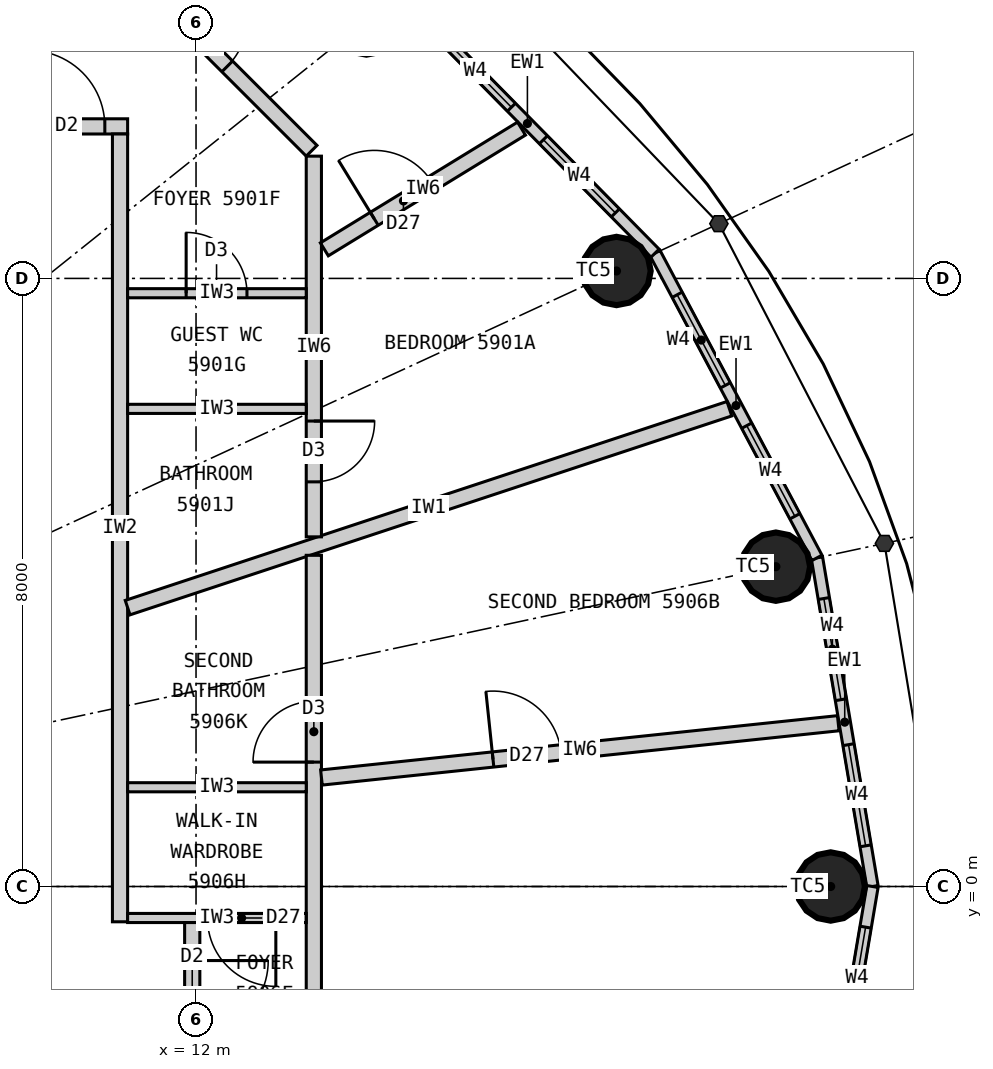
"""IFC4 building model, lengths in metres.
Left out: names, types, materials, properties, quantities, classifications, styles, units other than length and angle.
Written with IfcOpenShell. Run it as: python <this file> out.ifc"""

import sys

from ifc_helpers import new_model, si_unit, direction, frame, frame_2d, origin, origin_2d, place, context, subcontext, project, spatial, rectangle, circle, extrude, element, fill, save


model = new_model("IFC4")
c1 = context("Model", 3, precision=1e-05, world=origin(), true_north=direction((0.0, 1.0)))
c2 = subcontext(c1, "Body", "Model", "MODEL_VIEW")
j1 = project(units=[si_unit("LENGTHUNIT", "METRE"), si_unit("PLANEANGLEUNIT", "RADIAN")], contexts=[c1])
p1 = place(None, origin())
s1 = spatial("IfcSite", under=j1, at=p1, CompositionType="ELEMENT")
p2 = place(p1, origin())
s2 = spatial("IfcBuilding", under=s1, at=p2, CompositionType="ELEMENT")
p3 = place(p2, frame((0.0, 0.0, 219.3)))
s3 = spatial("IfcBuildingStorey", under=s2, at=p3, CompositionType="ELEMENT", Elevation=219.3)
for number, where, z_axis, x_axis in (
    (1, (20.35, 0.0, 0.0), (0.0, 0.0, 1.0), (1.0, 0.0, 0.0)),
    (2, (19.629, 4.208, 0.0), (0.0, 0.0, 1.0), (1.0, 0.0, 0.0)),
    (3, (17.532, 8.098, 0.0), (0.0, 0.0, 1.0), (1.0, 0.0, 0.0)),
    (4, (14.241, 11.393, 0.0), (0.0, 0.0, 1.0), (1.0, 0.0, 0.0)),
):
    element("IfcColumn", number, at=place(p3, frame(where, z_axis=z_axis, x_axis=x_axis)), inside=s3, PredefinedType="COLUMN", context=c2, shape_type="SweptSolid", body=[
        extrude(circle(Radius=0.45, at=origin_2d()), origin(), (0.0, 0.0, 1.0), 3.3),
    ])
p4 = place(p3, frame((20.9, 0.0, 0.0), z_axis=(0.0, 0.0, 1.0), x_axis=(-0.166538513568, 0.986034950445, 0.0)))
e5 = element("IfcWall", 5, at=p4, inside=s3, PredefinedType="ELEMENTEDWALL", context=c2, shape_type="SweptSolid", body=[
    extrude(rectangle(XDim=4.385, YDim=0.15, at=frame_2d((2.192, 0.0))), origin(), (0.0, 0.0, 1.0), 3.12),
])
p5 = place(p4, frame((0.542, 0.0, 0.9)))
e6 = element("IfcOpeningElement", 6, at=p5, cuts=e5, PredefinedType="OPENING", context=c2, shape_type="SweptSolid", body=[
    extrude(rectangle(XDim=1.35, YDim=1.9, at=frame_2d((0.675, 0.95))), frame((0.0, 0.085, 0.0), z_axis=(0.0, -1.0, 0.0), x_axis=(1.0, 0.0, 0.0)), (0.0, 0.0, 1.0), 0.17),
])
p6 = place(p4, frame((2.492, 0.0, 0.9)))
e7 = element("IfcOpeningElement", 7, at=p6, cuts=e5, PredefinedType="OPENING", context=c2, shape_type="SweptSolid", body=[
    extrude(rectangle(XDim=1.35, YDim=1.9, at=frame_2d((0.675, 0.95))), frame((0.0, 0.085, 0.0), z_axis=(0.0, -1.0, 0.0), x_axis=(1.0, 0.0, 0.0)), (0.0, 0.0, 1.0), 0.17),
])
p7 = place(p3, frame((20.17, 4.323, 0.0), z_axis=(0.0, 0.0, 1.0), x_axis=(-0.469256152955, 0.883062094597, 0.0)))
e8 = element("IfcWall", 8, at=p7, inside=s3, PredefinedType="ELEMENTEDWALL", context=c2, shape_type="SweptSolid", body=[
    extrude(rectangle(XDim=4.539, YDim=0.15, at=frame_2d((2.27, 0.0))), origin(), (0.0, 0.0, 1.0), 3.12),
])
p8 = place(p7, frame((0.62, 0.0, 0.9)))
e9 = element("IfcOpeningElement", 9, at=p8, cuts=e8, PredefinedType="OPENING", context=c2, shape_type="SweptSolid", body=[
    extrude(rectangle(XDim=1.35, YDim=1.9, at=frame_2d((0.675, 0.95))), frame((0.0, 0.085, 0.0), z_axis=(0.0, -1.0, 0.0), x_axis=(1.0, 0.0, 0.0)), (0.0, 0.0, 1.0), 0.17),
])
p9 = place(p7, frame((2.57, 0.0, 0.9)))
e10 = element("IfcOpeningElement", 10, at=p9, cuts=e8, PredefinedType="OPENING", context=c2, shape_type="SweptSolid", body=[
    extrude(rectangle(XDim=1.35, YDim=1.9, at=frame_2d((0.675, 0.95))), frame((0.0, 0.085, 0.0), z_axis=(0.0, -1.0, 0.0), x_axis=(1.0, 0.0, 0.0)), (0.0, 0.0, 1.0), 0.17),
])
p10 = place(p3, frame((18.04, 8.332, 0.0), z_axis=(0.0, 0.0, 1.0), x_axis=(-0.701527379618, 0.712642501993, 0.0)))
e11 = element("IfcWall", 11, at=p10, inside=s3, PredefinedType="ELEMENTEDWALL", context=c2, shape_type="SweptSolid", body=[
    extrude(rectangle(XDim=4.788, YDim=0.15, at=frame_2d((2.394, 0.0))), origin(), (0.0, 0.0, 1.0), 3.12),
])
p11 = place(p10, frame((0.744, 0.0, 0.9)))
e12 = element("IfcOpeningElement", 12, at=p11, cuts=e11, PredefinedType="OPENING", context=c2, shape_type="SweptSolid", body=[
    extrude(rectangle(XDim=1.35, YDim=1.9, at=frame_2d((0.675, 0.95))), frame((0.0, 0.085, 0.0), z_axis=(0.0, -1.0, 0.0), x_axis=(1.0, 0.0, 0.0)), (0.0, 0.0, 1.0), 0.17),
])
p12 = place(p10, frame((2.694, 0.0, 0.9)))
e13 = element("IfcOpeningElement", 13, at=p12, cuts=e11, PredefinedType="OPENING", context=c2, shape_type="SweptSolid", body=[
    extrude(rectangle(XDim=1.35, YDim=1.9, at=frame_2d((0.675, 0.95))), frame((0.0, 0.085, 0.0), z_axis=(0.0, -1.0, 0.0), x_axis=(1.0, 0.0, 0.0)), (0.0, 0.0, 1.0), 0.17),
])
p13 = place(p3, frame((20.17, -4.323, 0.0), z_axis=(0.0, 0.0, 1.0), x_axis=(0.166538513568, 0.986034950445, 0.0)))
e14 = element("IfcWall", 14, at=p13, inside=s3, PredefinedType="ELEMENTEDWALL", context=c2, shape_type="SweptSolid", body=[
    extrude(rectangle(XDim=4.385, YDim=0.15, at=frame_2d((2.192, 0.0))), origin(), (0.0, 0.0, 1.0), 3.12),
])
p14 = place(p13, frame((0.542, 0.0, 0.9)))
e15 = element("IfcOpeningElement", 15, at=p14, cuts=e14, PredefinedType="OPENING", context=c2, shape_type="SweptSolid", body=[
    extrude(rectangle(XDim=1.35, YDim=1.9, at=frame_2d((0.675, 0.95))), frame((0.0, 0.085, 0.0), z_axis=(0.0, -1.0, 0.0), x_axis=(1.0, 0.0, 0.0)), (0.0, 0.0, 1.0), 0.17),
])
p15 = place(p13, frame((2.492, 0.0, 0.9)))
e16 = element("IfcOpeningElement", 16, at=p15, cuts=e14, PredefinedType="OPENING", context=c2, shape_type="SweptSolid", body=[
    extrude(rectangle(XDim=1.35, YDim=1.9, at=frame_2d((0.675, 0.95))), frame((0.0, 0.085, 0.0), z_axis=(0.0, -1.0, 0.0), x_axis=(1.0, 0.0, 0.0)), (0.0, 0.0, 1.0), 0.17),
])
p16 = place(p3, frame((-11.1, 10.0, 0.0), z_axis=(0.0, 0.0, 1.0), x_axis=(1.0, 0.0, 0.0)))
e17 = element("IfcWall", 17, at=p16, inside=s3, PredefinedType="PARTITIONING", context=c2, shape_type="SweptSolid", body=[
    extrude(rectangle(XDim=22.2, YDim=0.2, at=frame_2d((11.1, 0.0))), origin(), (0.0, 0.0, 1.0), 3.12),
])
p17 = place(p16, frame((20.9, 0.0, 0.0)))
e18 = element("IfcOpeningElement", 18, at=p17, cuts=e17, PredefinedType="OPENING", context=c2, shape_type="SweptSolid", body=[
    extrude(rectangle(XDim=1.0, YDim=2.2, at=frame_2d((0.5, 1.1))), frame((0.0, 0.11, 0.0), z_axis=(0.0, -1.0, 0.0), x_axis=(1.0, 0.0, 0.0)), (0.0, 0.0, 1.0), 0.22),
])
p18 = place(p16, frame((2.82, 0.0, 0.0)))
e19 = element("IfcOpeningElement", 19, at=p18, cuts=e17, PredefinedType="OPENING", context=c2, shape_type="SweptSolid", body=[
    extrude(rectangle(XDim=1.0, YDim=2.2, at=frame_2d((0.5, 1.1))), frame((0.0, 0.11, 0.0), z_axis=(0.0, -1.0, 0.0), x_axis=(1.0, 0.0, 0.0)), (0.0, 0.0, 1.0), 0.22),
])
p19 = place(p3, frame((11.0, -0.464, 0.0), z_axis=(0.0, 0.0, 1.0), x_axis=(0.0, 1.0, 0.0)))
e20 = element("IfcWall", 20, at=p19, inside=s3, PredefinedType="PARTITIONING", context=c2, shape_type="SweptSolid", body=[
    extrude(rectangle(XDim=10.364, YDim=0.2, at=frame_2d((5.182, 0.0))), origin(), (0.0, 0.0, 1.0), 3.12),
])
p20 = place(p3, frame((11.1, 3.669, 0.0), z_axis=(0.0, 0.0, 1.0), x_axis=(0.949476668397, 0.313837627079, 0.0)))
e21 = element("IfcWall", 21, at=p20, inside=s3, PredefinedType="PARTITIONING", context=c2, shape_type="SweptSolid", body=[
    extrude(rectangle(XDim=8.339, YDim=0.2, at=frame_2d((4.169, 0.0))), origin(), (0.0, 0.0, 1.0), 3.12),
])
p21 = place(p3, frame((13.55, 4.6, 0.0), z_axis=(0.0, 0.0, 1.0), x_axis=(0.0, 1.0, 0.0)))
e22 = element("IfcWall", 22, at=p21, inside=s3, PredefinedType="PARTITIONING", context=c2, shape_type="SweptSolid", body=[
    extrude(rectangle(XDim=5.009, YDim=0.2, at=frame_2d((2.504, 0.0))), origin(), (0.0, 0.0, 1.0), 3.12),
])
p22 = place(p21, frame((0.724, 0.0, 0.0)))
e23 = element("IfcOpeningElement", 23, at=p22, cuts=e22, PredefinedType="OPENING", context=c2, shape_type="SweptSolid", body=[
    extrude(rectangle(XDim=0.8, YDim=2.1, at=frame_2d((0.4, 1.05))), frame((0.0, 0.11, 0.0), z_axis=(0.0, -1.0, 0.0), x_axis=(1.0, 0.0, 0.0)), (0.0, 0.0, 1.0), 0.22),
])
p23 = place(p3, frame((13.521, 9.679, 0.0), z_axis=(0.0, 0.0, 1.0), x_axis=(-0.707106781187, 0.707106781187, 0.0)))
e24 = element("IfcWall", 24, at=p23, inside=s3, PredefinedType="PARTITIONING", context=c2, shape_type="SweptSolid", body=[
    extrude(rectangle(XDim=4.019, YDim=0.2, at=frame_2d((2.009, 0.0))), origin(), (0.0, 0.0, 1.0), 3.12),
])
p24 = place(p23, frame((1.57, 0.0, 0.0)))
e25 = element("IfcOpeningElement", 25, at=p24, cuts=e24, PredefinedType="OPENING", context=c2, shape_type="SweptSolid", body=[
    extrude(rectangle(XDim=0.9, YDim=2.1, at=frame_2d((0.45, 1.05))), frame((0.0, 0.11, 0.0), z_axis=(0.0, -1.0, 0.0), x_axis=(1.0, 0.0, 0.0)), (0.0, 0.0, 1.0), 0.22),
])
p25 = place(p3, frame((13.688, 8.382, 0.0), z_axis=(0.0, 0.0, 1.0), x_axis=(0.852783459586, 0.522264656144, 0.0)))
e26 = element("IfcWall", 26, at=p25, inside=s3, PredefinedType="PARTITIONING", context=c2, shape_type="SweptSolid", body=[
    extrude(rectangle(XDim=3.042, YDim=0.2, at=frame_2d((1.521, 0.0))), origin(), (0.0, 0.0, 1.0), 3.12),
])
p26 = place(p25, frame((0.77, 0.0, 0.0)))
e27 = element("IfcOpeningElement", 27, at=p26, cuts=e26, PredefinedType="OPENING", context=c2, shape_type="SweptSolid", body=[
    extrude(rectangle(XDim=0.9, YDim=2.1, at=frame_2d((0.45, 1.05))), frame((0.0, 0.11, 0.0), z_axis=(0.0, -1.0, 0.0), x_axis=(1.0, 0.0, 0.0)), (0.0, 0.0, 1.0), 0.22),
])
p27 = place(p3, frame((11.1, 6.284, 0.0), z_axis=(0.0, 0.0, 1.0), x_axis=(1.0, 0.0, 0.0)))
e28 = element("IfcWall", 28, at=p27, inside=s3, PredefinedType="PARTITIONING", context=c2, shape_type="SweptSolid", body=[
    extrude(rectangle(XDim=2.35, YDim=0.12, at=frame_2d((1.175, 0.0))), origin(), (0.0, 0.0, 1.0), 3.12),
])
p28 = place(p3, frame((11.1, 7.805, 0.0), z_axis=(0.0, 0.0, 1.0), x_axis=(1.0, 0.0, 0.0)))
e29 = element("IfcWall", 29, at=p28, inside=s3, PredefinedType="PARTITIONING", context=c2, shape_type="SweptSolid", body=[
    extrude(rectangle(XDim=2.35, YDim=0.12, at=frame_2d((1.175, 0.0))), origin(), (0.0, 0.0, 1.0), 3.12),
])
p29 = place(p28, frame((0.77, 0.0, 0.0)))
e30 = element("IfcOpeningElement", 30, at=p29, cuts=e29, PredefinedType="OPENING", context=c2, shape_type="SweptSolid", body=[
    extrude(rectangle(XDim=0.8, YDim=2.1, at=frame_2d((0.4, 1.05))), frame((0.0, 0.07, 0.0), z_axis=(0.0, -1.0, 0.0), x_axis=(1.0, 0.0, 0.0)), (0.0, 0.0, 1.0), 0.14),
])
p30 = place(p3, frame((13.55, -8.139, 0.0), z_axis=(0.0, 0.0, 1.0), x_axis=(0.0, 1.0, 0.0)))
e31 = element("IfcWall", 31, at=p30, inside=s3, PredefinedType="PARTITIONING", context=c2, shape_type="SweptSolid", body=[
    extrude(rectangle(XDim=12.496, YDim=0.2, at=frame_2d((6.248, 0.0))), origin(), (0.0, 0.0, 1.0), 3.12),
])
p31 = place(p30, frame((2.42, 0.0, 0.0)))
e32 = element("IfcOpeningElement", 32, at=p31, cuts=e31, PredefinedType="OPENING", context=c2, shape_type="SweptSolid", body=[
    extrude(rectangle(XDim=0.8, YDim=2.1, at=frame_2d((0.4, 1.05))), frame((0.0, 0.11, 0.0), z_axis=(0.0, -1.0, 0.0), x_axis=(1.0, 0.0, 0.0)), (0.0, 0.0, 1.0), 0.22),
])
p32 = place(p30, frame((9.776, 0.0, 0.0)))
e33 = element("IfcOpeningElement", 33, at=p32, cuts=e31, PredefinedType="OPENING", context=c2, shape_type="SweptSolid", body=[
    extrude(rectangle(XDim=0.8, YDim=2.1, at=frame_2d((0.4, 1.05))), frame((0.0, 0.11, 0.0), z_axis=(0.0, -1.0, 0.0), x_axis=(1.0, 0.0, 0.0)), (0.0, 0.0, 1.0), 0.22),
])
p33 = place(p30, frame((5.82, 0.0, 0.0)))
e34 = element("IfcOpeningElement", 34, at=p33, cuts=e31, PredefinedType="OPENING", context=c2, shape_type="SweptSolid", body=[
    extrude(rectangle(XDim=0.9, YDim=2.1, at=frame_2d((0.45, 1.05))), frame((0.0, 0.11, 0.0), z_axis=(0.0, -1.0, 0.0), x_axis=(1.0, 0.0, 0.0)), (0.0, 0.0, 1.0), 0.22),
])
p34 = place(p3, frame((13.65, 1.434, 0.0), z_axis=(0.0, 0.0, 1.0), x_axis=(0.994526954268, 0.10448031984, 0.0)))
e35 = element("IfcWall", 35, at=p34, inside=s3, PredefinedType="PARTITIONING", context=c2, shape_type="SweptSolid", body=[
    extrude(rectangle(XDim=6.837, YDim=0.2, at=frame_2d((3.418, 0.0))), origin(), (0.0, 0.0, 1.0), 2.47),
])
p35 = place(p34, frame((2.27, 0.0, 0.0)))
e36 = element("IfcOpeningElement", 36, at=p35, cuts=e35, PredefinedType="OPENING", context=c2, shape_type="SweptSolid", body=[
    extrude(rectangle(XDim=0.9, YDim=2.1, at=frame_2d((0.45, 1.05))), frame((0.0, 0.11, 0.0), z_axis=(0.0, -1.0, 0.0), x_axis=(1.0, 0.0, 0.0)), (0.0, 0.0, 1.0), 0.22),
])
p36 = place(p3, frame((11.1, -0.414, 0.0), z_axis=(0.0, 0.0, 1.0), x_axis=(1.0, 0.0, 0.0)))
e37 = element("IfcWall", 37, at=p36, inside=s3, PredefinedType="PARTITIONING", context=c2, shape_type="SweptSolid", body=[
    extrude(rectangle(XDim=2.35, YDim=0.12, at=frame_2d((1.175, 0.0))), origin(), (0.0, 0.0, 1.0), 3.12),
])
p37 = place(p36, frame((1.05, 0.0, 0.0)))
e38 = element("IfcOpeningElement", 38, at=p37, cuts=e37, PredefinedType="OPENING", context=c2, shape_type="SweptSolid", body=[
    extrude(rectangle(XDim=0.9, YDim=2.1, at=frame_2d((0.45, 1.05))), frame((0.0, 0.07, 0.0), z_axis=(0.0, -1.0, 0.0), x_axis=(1.0, 0.0, 0.0)), (0.0, 0.0, 1.0), 0.14),
])
p38 = place(p3, frame((11.1, 1.306, 0.0), z_axis=(0.0, 0.0, 1.0), x_axis=(1.0, 0.0, 0.0)))
e39 = element("IfcWall", 39, at=p38, inside=s3, PredefinedType="PARTITIONING", context=c2, shape_type="SweptSolid", body=[
    extrude(rectangle(XDim=2.35, YDim=0.12, at=frame_2d((1.175, 0.0))), origin(), (0.0, 0.0, 1.0), 3.12),
])
p39 = place(p3, frame((11.95, -2.474, 0.0), z_axis=(0.0, 0.0, 1.0), x_axis=(0.0, 1.0, 0.0)))
e40 = element("IfcWall", 40, at=p39, inside=s3, PredefinedType="PARTITIONING", context=c2, shape_type="SweptSolid", body=[
    extrude(rectangle(XDim=2.0, YDim=0.2, at=frame_2d((1.0, 0.0))), origin(), (0.0, 0.0, 1.0), 3.12),
])
p40 = place(p39, frame((0.5, 0.0, 0.0)))
e41 = element("IfcOpeningElement", 41, at=p40, cuts=e40, PredefinedType="OPENING", context=c2, shape_type="SweptSolid", body=[
    extrude(rectangle(XDim=1.0, YDim=2.2, at=frame_2d((0.5, 1.1))), frame((0.0, 0.11, 0.0), z_axis=(0.0, -1.0, 0.0), x_axis=(1.0, 0.0, 0.0)), (0.0, 0.0, 1.0), 0.22),
])
p41 = place(p5, origin())
e42 = element("IfcWindow", 42, at=p41, inside=s3, PartitioningType="SINGLE_PANEL", PredefinedType="WINDOW", context=c2, shape_type="SweptSolid", body=[
    extrude(rectangle(XDim=1.35, YDim=1.9, at=frame_2d((0.675, 0.95))), frame((0.0, 0.03, 0.0), z_axis=(0.0, -1.0, 0.0), x_axis=(1.0, 0.0, 0.0)), (0.0, 0.0, 1.0), 0.06),
])
fill(e6, e42)
p42 = place(p6, origin())
e43 = element("IfcWindow", 43, at=p42, inside=s3, PartitioningType="SINGLE_PANEL", PredefinedType="WINDOW", context=c2, shape_type="SweptSolid", body=[
    extrude(rectangle(XDim=1.35, YDim=1.9, at=frame_2d((0.675, 0.95))), frame((0.0, 0.03, 0.0), z_axis=(0.0, -1.0, 0.0), x_axis=(1.0, 0.0, 0.0)), (0.0, 0.0, 1.0), 0.06),
])
fill(e7, e43)
p43 = place(p8, origin())
e44 = element("IfcWindow", 44, at=p43, inside=s3, PartitioningType="SINGLE_PANEL", PredefinedType="WINDOW", context=c2, shape_type="SweptSolid", body=[
    extrude(rectangle(XDim=1.35, YDim=1.9, at=frame_2d((0.675, 0.95))), frame((0.0, 0.03, 0.0), z_axis=(0.0, -1.0, 0.0), x_axis=(1.0, 0.0, 0.0)), (0.0, 0.0, 1.0), 0.06),
])
fill(e9, e44)
p44 = place(p9, origin())
e45 = element("IfcWindow", 45, at=p44, inside=s3, PartitioningType="SINGLE_PANEL", PredefinedType="WINDOW", context=c2, shape_type="SweptSolid", body=[
    extrude(rectangle(XDim=1.35, YDim=1.9, at=frame_2d((0.675, 0.95))), frame((0.0, 0.03, 0.0), z_axis=(0.0, -1.0, 0.0), x_axis=(1.0, 0.0, 0.0)), (0.0, 0.0, 1.0), 0.06),
])
fill(e10, e45)
p45 = place(p11, origin())
e46 = element("IfcWindow", 46, at=p45, inside=s3, PartitioningType="SINGLE_PANEL", PredefinedType="WINDOW", context=c2, shape_type="SweptSolid", body=[
    extrude(rectangle(XDim=1.35, YDim=1.9, at=frame_2d((0.675, 0.95))), frame((0.0, 0.03, 0.0), z_axis=(0.0, -1.0, 0.0), x_axis=(1.0, 0.0, 0.0)), (0.0, 0.0, 1.0), 0.06),
])
fill(e12, e46)
p46 = place(p12, origin())
e47 = element("IfcWindow", 47, at=p46, inside=s3, PartitioningType="SINGLE_PANEL", PredefinedType="WINDOW", context=c2, shape_type="SweptSolid", body=[
    extrude(rectangle(XDim=1.35, YDim=1.9, at=frame_2d((0.675, 0.95))), frame((0.0, 0.03, 0.0), z_axis=(0.0, -1.0, 0.0), x_axis=(1.0, 0.0, 0.0)), (0.0, 0.0, 1.0), 0.06),
])
fill(e13, e47)
p47 = place(p15, origin())
e48 = element("IfcWindow", 48, at=p47, inside=s3, PartitioningType="SINGLE_PANEL", PredefinedType="WINDOW", context=c2, shape_type="SweptSolid", body=[
    extrude(rectangle(XDim=1.35, YDim=1.9, at=frame_2d((0.675, 0.95))), frame((0.0, 0.03, 0.0), z_axis=(0.0, -1.0, 0.0), x_axis=(1.0, 0.0, 0.0)), (0.0, 0.0, 1.0), 0.06),
])
fill(e16, e48)
p48 = place(p17, origin())
e49 = element("IfcDoor", 49, at=p48, inside=s3, OperationType="SINGLE_SWING_LEFT", PredefinedType="DOOR", context=c2, shape_type="SweptSolid", body=[
    extrude(rectangle(XDim=1.0, YDim=2.2, at=frame_2d((0.5, 1.1))), frame((0.0, 0.025, 0.0), z_axis=(0.0, -1.0, 0.0), x_axis=(1.0, 0.0, 0.0)), (0.0, 0.0, 1.0), 0.05),
])
fill(e18, e49)
p49 = place(p22, origin())
e50 = element("IfcDoor", 50, at=p49, inside=s3, OperationType="SINGLE_SWING_RIGHT", PredefinedType="DOOR", context=c2, shape_type="SweptSolid", body=[
    extrude(rectangle(XDim=0.8, YDim=2.1, at=frame_2d((0.4, 1.05))), frame((0.0, 0.025, 0.0), z_axis=(0.0, -1.0, 0.0), x_axis=(1.0, 0.0, 0.0)), (0.0, 0.0, 1.0), 0.05),
])
fill(e23, e50)
p50 = place(p29, origin())
e51 = element("IfcDoor", 51, at=p50, inside=s3, OperationType="SINGLE_SWING_LEFT", PredefinedType="DOOR", context=c2, shape_type="SweptSolid", body=[
    extrude(rectangle(XDim=0.8, YDim=2.1, at=frame_2d((0.4, 1.05))), frame((0.0, 0.025, 0.0), z_axis=(0.0, -1.0, 0.0), x_axis=(1.0, 0.0, 0.0)), (0.0, 0.0, 1.0), 0.05),
])
fill(e30, e51)
p51 = place(p24, origin())
e52 = element("IfcDoor", 52, at=p51, inside=s3, OperationType="SINGLE_SWING_RIGHT", PredefinedType="DOOR", context=c2, shape_type="SweptSolid", body=[
    extrude(rectangle(XDim=0.9, YDim=2.1, at=frame_2d((0.45, 1.05))), frame((0.0, 0.025, 0.0), z_axis=(0.0, -1.0, 0.0), x_axis=(1.0, 0.0, 0.0)), (0.0, 0.0, 1.0), 0.05),
])
fill(e25, e52)
p52 = place(p26, origin())
e53 = element("IfcDoor", 53, at=p52, inside=s3, OperationType="SINGLE_SWING_LEFT", PredefinedType="DOOR", context=c2, shape_type="SweptSolid", body=[
    extrude(rectangle(XDim=0.9, YDim=2.1, at=frame_2d((0.45, 1.05))), frame((0.0, 0.025, 0.0), z_axis=(0.0, -1.0, 0.0), x_axis=(1.0, 0.0, 0.0)), (0.0, 0.0, 1.0), 0.05),
])
fill(e27, e53)
p53 = place(p40, origin())
e54 = element("IfcDoor", 54, at=p53, inside=s3, OperationType="SINGLE_SWING_RIGHT", PredefinedType="DOOR", context=c2, shape_type="SweptSolid", body=[
    extrude(rectangle(XDim=1.0, YDim=2.2, at=frame_2d((0.5, 1.1))), frame((0.0, 0.025, 0.0), z_axis=(0.0, -1.0, 0.0), x_axis=(1.0, 0.0, 0.0)), (0.0, 0.0, 1.0), 0.05),
])
fill(e41, e54)
p54 = place(p37, origin())
e55 = element("IfcDoor", 55, at=p54, inside=s3, OperationType="SINGLE_SWING_RIGHT", PredefinedType="DOOR", context=c2, shape_type="SweptSolid", body=[
    extrude(rectangle(XDim=0.9, YDim=2.1, at=frame_2d((0.45, 1.05))), frame((0.0, 0.025, 0.0), z_axis=(0.0, -1.0, 0.0), x_axis=(1.0, 0.0, 0.0)), (0.0, 0.0, 1.0), 0.05),
])
fill(e38, e55)
p55 = place(p32, origin())
e56 = element("IfcDoor", 56, at=p55, inside=s3, OperationType="SINGLE_SWING_LEFT", PredefinedType="DOOR", context=c2, shape_type="SweptSolid", body=[
    extrude(rectangle(XDim=0.8, YDim=2.1, at=frame_2d((0.4, 1.05))), frame((0.0, 0.025, 0.0), z_axis=(0.0, -1.0, 0.0), x_axis=(1.0, 0.0, 0.0)), (0.0, 0.0, 1.0), 0.05),
])
fill(e33, e56)
p56 = place(p35, origin())
e57 = element("IfcDoor", 57, at=p56, inside=s3, OperationType="SINGLE_SWING_LEFT", PredefinedType="DOOR", context=c2, shape_type="SweptSolid", body=[
    extrude(rectangle(XDim=0.9, YDim=2.1, at=frame_2d((0.45, 1.05))), frame((0.0, 0.025, 0.0), z_axis=(0.0, -1.0, 0.0), x_axis=(1.0, 0.0, 0.0)), (0.0, 0.0, 1.0), 0.05),
])
fill(e36, e57)
save(model, sys.argv[1])
